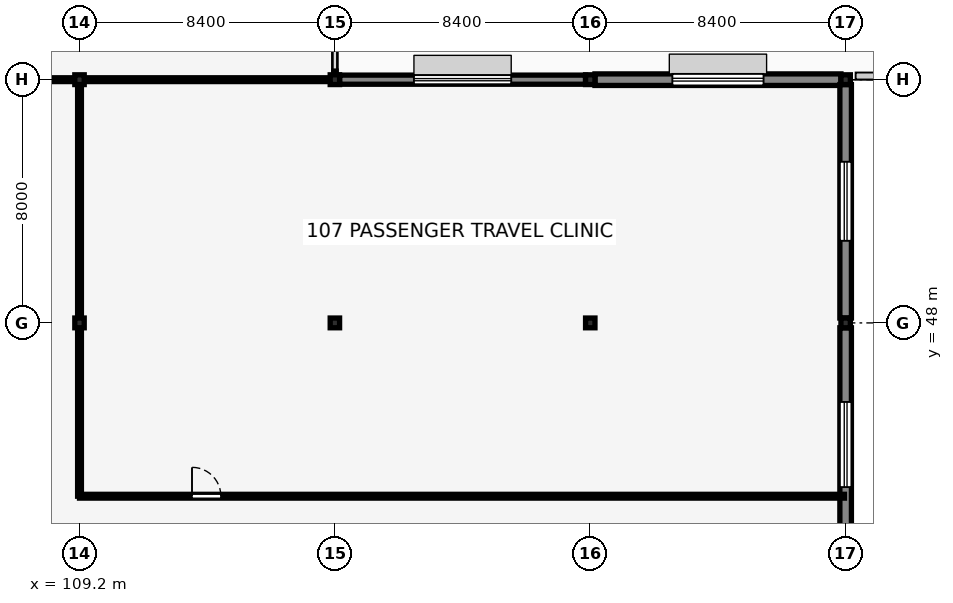
"""IFC4 building model, lengths in metres.
Left out: names, types, materials, properties, quantities, classifications, styles, units other than length and angle.
Written with IfcOpenShell. Run it as: python <this file> out.ifc"""

import sys

from ifc_helpers import new_model, si_unit, direction, frame, frame_2d, origin, origin_2d, place, context, subcontext, project, spatial, rectangle, i_section, extrude, element, fill, save


model = new_model("IFC4")
c1 = context("Model", 3, precision=1e-05, world=origin(), true_north=direction((0.0, 1.0)))
c2 = subcontext(c1, "Body", "Model", "MODEL_VIEW")
j1 = project(units=[si_unit("LENGTHUNIT", "METRE"), si_unit("PLANEANGLEUNIT", "RADIAN")], contexts=[c1])
p1 = place(None, origin())
s1 = spatial("IfcSite", under=j1, at=p1, CompositionType="ELEMENT")
p2 = place(p1, origin())
s2 = spatial("IfcBuilding", under=s1, at=p2, CompositionType="ELEMENT")
p3 = place(p2, frame((0.0, 0.0, 5.44)))
s3 = spatial("IfcBuildingStorey", under=s2, at=p3, CompositionType="ELEMENT", Elevation=5.44)
for number, where, z_axis, x_axis in (
    (1, (109.2, 48.0, 0.0), (0.0, 0.0, 1.0), (1.0, 0.0, 0.0)),
    (2, (109.2, 56.0, 0.0), (0.0, 0.0, 1.0), (1.0, 0.0, 0.0)),
    (3, (117.6, 48.0, 0.0), (0.0, 0.0, 1.0), (1.0, 0.0, 0.0)),
    (4, (117.6, 56.0, 0.0), (0.0, 0.0, 1.0), (1.0, 0.0, 0.0)),
    (5, (126.0, 48.0, 0.0), (0.0, 0.0, 1.0), (1.0, 0.0, 0.0)),
    (6, (126.0, 56.0, 0.0), (0.0, 0.0, 1.0), (1.0, 0.0, 0.0)),
    (7, (134.4, 48.0, 0.0), (0.0, 0.0, 1.0), (1.0, 0.0, 0.0)),
    (8, (134.4, 56.0, 0.0), (0.0, 0.0, 1.0), (1.0, 0.0, 0.0)),
):
    element("IfcColumn", number, at=place(p3, frame(where, z_axis=z_axis, x_axis=x_axis)), inside=s3, PredefinedType="COLUMN", context=c2, shape_type="SweptSolid", body=[
        extrude(i_section(OverallWidth=0.309, OverallDepth=0.321, WebThickness=0.014, FlangeThickness=0.022, FilletRadius=0.015, at=origin_2d()), origin(), (0.0, 0.0, 1.0), 3.8),
    ])
p4 = place(p3, frame((117.755, 56.0, 0.0), z_axis=(0.0, 0.0, 1.0), x_axis=(1.0, 0.0, 0.0)))
e9 = element("IfcWall", 9, at=p4, inside=s3, PredefinedType="SOLIDWALL", context=c2, shape_type="SweptSolid", body=[
    extrude(rectangle(XDim=8.091, YDim=0.3, at=frame_2d((4.045, 0.0))), origin(), (0.0, 0.0, 1.0), 3.45),
])
p5 = place(p4, frame((2.445, 0.0, 0.9), z_axis=(0.0, 0.0, 1.0), x_axis=(1.0, 0.0, 0.0)))
e10 = element("IfcOpeningElement", 10, at=p5, cuts=e9, PredefinedType="OPENING", context=c2, shape_type="SweptSolid", body=[
    extrude(rectangle(XDim=3.2, YDim=1.65, at=frame_2d((1.6, 0.825))), frame((0.0, 0.16, 0.0), z_axis=(0.0, -1.0, 0.0), x_axis=(1.0, 0.0, 0.0)), (0.0, 0.0, 1.0), 0.32),
])
p6 = place(p3, frame((126.155, 56.0, 0.0), z_axis=(0.0, 0.0, 1.0), x_axis=(1.0, 0.0, 0.0)))
e11 = element("IfcWall", 11, at=p6, inside=s3, PredefinedType="SOLIDWALL", context=c2, shape_type="SweptSolid", body=[
    extrude(rectangle(XDim=8.091, YDim=0.38, at=frame_2d((4.045, 0.0))), origin(), (0.0, 0.0, 1.0), 3.45),
])
p7 = place(p6, frame((2.545, 0.0, 0.9), z_axis=(0.0, 0.0, 1.0), x_axis=(1.0, 0.0, 0.0)))
e12 = element("IfcOpeningElement", 12, at=p7, cuts=e11, PredefinedType="OPENING", context=c2, shape_type="SweptSolid", body=[
    extrude(rectangle(XDim=3.0, YDim=1.65, at=frame_2d((1.5, 0.825))), frame((0.0, 0.2, 0.0), z_axis=(0.0, -1.0, 0.0), x_axis=(1.0, 0.0, 0.0)), (0.0, 0.0, 1.0), 0.4),
])
p8 = place(p3, frame((134.4, 40.16, 0.0), z_axis=(0.0, 0.0, 1.0), x_axis=(0.0, 1.0, 0.0)))
e13 = element("IfcWall", 13, at=p8, inside=s3, PredefinedType="SOLIDWALL", context=c2, shape_type="SweptSolid", body=[
    extrude(rectangle(XDim=7.679, YDim=0.38, at=frame_2d((3.84, 0.0))), origin(), (0.0, 0.0, 1.0), 3.442),
])
p9 = place(p8, frame((2.44, 0.0, 0.9), z_axis=(0.0, 0.0, 1.0), x_axis=(1.0, 0.0, 0.0)))
e14 = element("IfcOpeningElement", 14, at=p9, cuts=e13, PredefinedType="OPENING", context=c2, shape_type="SweptSolid", body=[
    extrude(rectangle(XDim=2.8, YDim=1.6, at=frame_2d((1.4, 0.8))), frame((0.0, 0.2, 0.0), z_axis=(0.0, -1.0, 0.0), x_axis=(1.0, 0.0, 0.0)), (0.0, 0.0, 1.0), 0.4),
])
p10 = place(p3, frame((134.4, 48.16, 0.0), z_axis=(0.0, 0.0, 1.0), x_axis=(0.0, 1.0, 0.0)))
e15 = element("IfcWall", 15, at=p10, inside=s3, PredefinedType="SOLIDWALL", context=c2, shape_type="SweptSolid", body=[
    extrude(rectangle(XDim=7.679, YDim=0.38, at=frame_2d((3.84, 0.0))), origin(), (0.0, 0.0, 1.0), 3.442),
])
p11 = place(p10, frame((2.54, 0.0, 0.9), z_axis=(0.0, 0.0, 1.0), x_axis=(1.0, 0.0, 0.0)))
e16 = element("IfcOpeningElement", 16, at=p11, cuts=e15, PredefinedType="OPENING", context=c2, shape_type="SweptSolid", body=[
    extrude(rectangle(XDim=2.6, YDim=1.8, at=frame_2d((1.3, 0.9))), frame((0.0, 0.2, 0.0), z_axis=(0.0, -1.0, 0.0), x_axis=(1.0, 0.0, 0.0)), (0.0, 0.0, 1.0), 0.4),
])
p12 = place(p3, frame((150.85, 56.12, 0.0), z_axis=(0.0, 0.0, 1.0), x_axis=(-1.0, 0.0, 0.0)))
e17 = element("IfcWall", 17, at=p12, inside=s3, PredefinedType="PARAPET", context=c2, shape_type="SweptSolid", body=[
    extrude(rectangle(XDim=16.122, YDim=0.23, at=frame_2d((8.061, 0.0))), origin(), (0.0, 0.0, 1.0), 1.05),
])
p13 = place(p3, frame((109.2, 42.3, 0.0), z_axis=(0.0, 0.0, 1.0), x_axis=(1.0, 0.0, 0.0)))
e18 = element("IfcWall", 18, at=p13, inside=s3, PredefinedType="PARTITIONING", context=c2, shape_type="SweptSolid", body=[
    extrude(rectangle(XDim=25.16, YDim=0.125, at=frame_2d((12.58, 0.0))), origin(), (0.0, 0.0, 1.0), 3.8),
])
p14 = place(p13, frame((3.7, 0.0, 0.0), z_axis=(0.0, 0.0, 1.0), x_axis=(1.0, 0.0, 0.0)))
e19 = element("IfcOpeningElement", 19, at=p14, cuts=e18, PredefinedType="OPENING", context=c2, shape_type="SweptSolid", body=[
    extrude(rectangle(XDim=0.95, YDim=2.15, at=frame_2d((0.475, 1.075))), frame((0.0, 0.073, 0.0), z_axis=(0.0, -1.0, 0.0), x_axis=(1.0, 0.0, 0.0)), (0.0, 0.0, 1.0), 0.145),
])
p15 = place(p3, frame((109.344, 56.0, 0.0), z_axis=(0.0, 0.0, 1.0), x_axis=(1.0, 0.0, 0.0)))
e20 = element("IfcWall", 20, at=p15, inside=s3, PredefinedType="PARTITIONING", context=c2, shape_type="SweptSolid", body=[
    extrude(rectangle(XDim=8.111, YDim=0.125, at=frame_2d((4.055, 0.0))), origin(), (0.0, 0.0, 1.0), 3.26),
])
p16 = place(p3, frame((109.2, 42.3, 0.0), z_axis=(0.0, 0.0, 1.0), x_axis=(0.0, 1.0, 0.0)))
e21 = element("IfcWall", 21, at=p16, inside=s3, PredefinedType="PARTITIONING", context=c2, shape_type="SweptSolid", body=[
    extrude(rectangle(XDim=5.55, YDim=0.125, at=frame_2d((2.775, 0.0))), origin(), (0.0, 0.0, 1.0), 3.337),
])
p17 = place(p3, frame((109.2, 48.15, 0.0), z_axis=(0.0, 0.0, 1.0), x_axis=(0.0, 1.0, 0.0)))
e22 = element("IfcWall", 22, at=p17, inside=s3, PredefinedType="PARTITIONING", context=c2, shape_type="SweptSolid", body=[
    extrude(rectangle(XDim=7.699, YDim=0.125, at=frame_2d((3.85, 0.0))), origin(), (0.0, 0.0, 1.0), 3.337),
])
p18 = place(p3, frame((103.0, 56.0, 0.0), z_axis=(0.0, 0.0, 1.0), x_axis=(1.0, 0.0, 0.0)))
e23 = element("IfcWall", 23, at=p18, inside=s3, PredefinedType="PARTITIONING", context=c2, shape_type="SweptSolid", body=[
    extrude(rectangle(XDim=6.055, YDim=0.125, at=frame_2d((3.028, 0.0))), origin(), (0.0, 0.0, 1.0), 3.26),
])
p19 = place(p5, origin())
e24 = element("IfcWindow", 24, at=p19, inside=s3, PartitioningType="TRIPLE_PANEL_VERTICAL", PredefinedType="WINDOW", context=c2, shape_type="SweptSolid", body=[
    extrude(rectangle(XDim=3.2, YDim=1.65, at=frame_2d((1.6, 0.825))), frame((0.0, 0.03, 0.0), z_axis=(0.0, -1.0, 0.0), x_axis=(1.0, 0.0, 0.0)), (0.0, 0.0, 1.0), 0.06),
])
fill(e10, e24)
p20 = place(p7, origin())
e25 = element("IfcWindow", 25, at=p20, inside=s3, PartitioningType="DOUBLE_PANEL_VERTICAL", PredefinedType="WINDOW", context=c2, shape_type="SweptSolid", body=[
    extrude(rectangle(XDim=3.0, YDim=1.65, at=frame_2d((1.5, 0.825))), frame((0.0, 0.03, 0.0), z_axis=(0.0, -1.0, 0.0), x_axis=(1.0, 0.0, 0.0)), (0.0, 0.0, 1.0), 0.06),
])
fill(e12, e25)
p21 = place(p9, origin())
e26 = element("IfcWindow", 26, at=p21, inside=s3, PartitioningType="DOUBLE_PANEL_VERTICAL", PredefinedType="WINDOW", context=c2, shape_type="SweptSolid", body=[
    extrude(rectangle(XDim=2.8, YDim=1.6, at=frame_2d((1.4, 0.8))), frame((0.0, 0.03, 0.0), z_axis=(0.0, -1.0, 0.0), x_axis=(1.0, 0.0, 0.0)), (0.0, 0.0, 1.0), 0.06),
])
fill(e14, e26)
p22 = place(p11, origin())
e27 = element("IfcWindow", 27, at=p22, inside=s3, PartitioningType="DOUBLE_PANEL_VERTICAL", PredefinedType="WINDOW", context=c2, shape_type="SweptSolid", body=[
    extrude(rectangle(XDim=2.6, YDim=1.8, at=frame_2d((1.3, 0.9))), frame((0.0, 0.03, 0.0), z_axis=(0.0, -1.0, 0.0), x_axis=(1.0, 0.0, 0.0)), (0.0, 0.0, 1.0), 0.06),
])
fill(e16, e27)
p23 = place(p14, origin())
e28 = element("IfcDoor", 28, at=p23, inside=s3, OperationType="SINGLE_SWING_LEFT", PredefinedType="DOOR", context=c2, shape_type="SweptSolid", body=[
    extrude(rectangle(XDim=0.95, YDim=2.15, at=frame_2d((0.475, 1.075))), frame((0.0, 0.025, 0.0), z_axis=(0.0, -1.0, 0.0), x_axis=(1.0, 0.0, 0.0)), (0.0, 0.0, 1.0), 0.05),
])
fill(e19, e28)
save(model, sys.argv[1])
